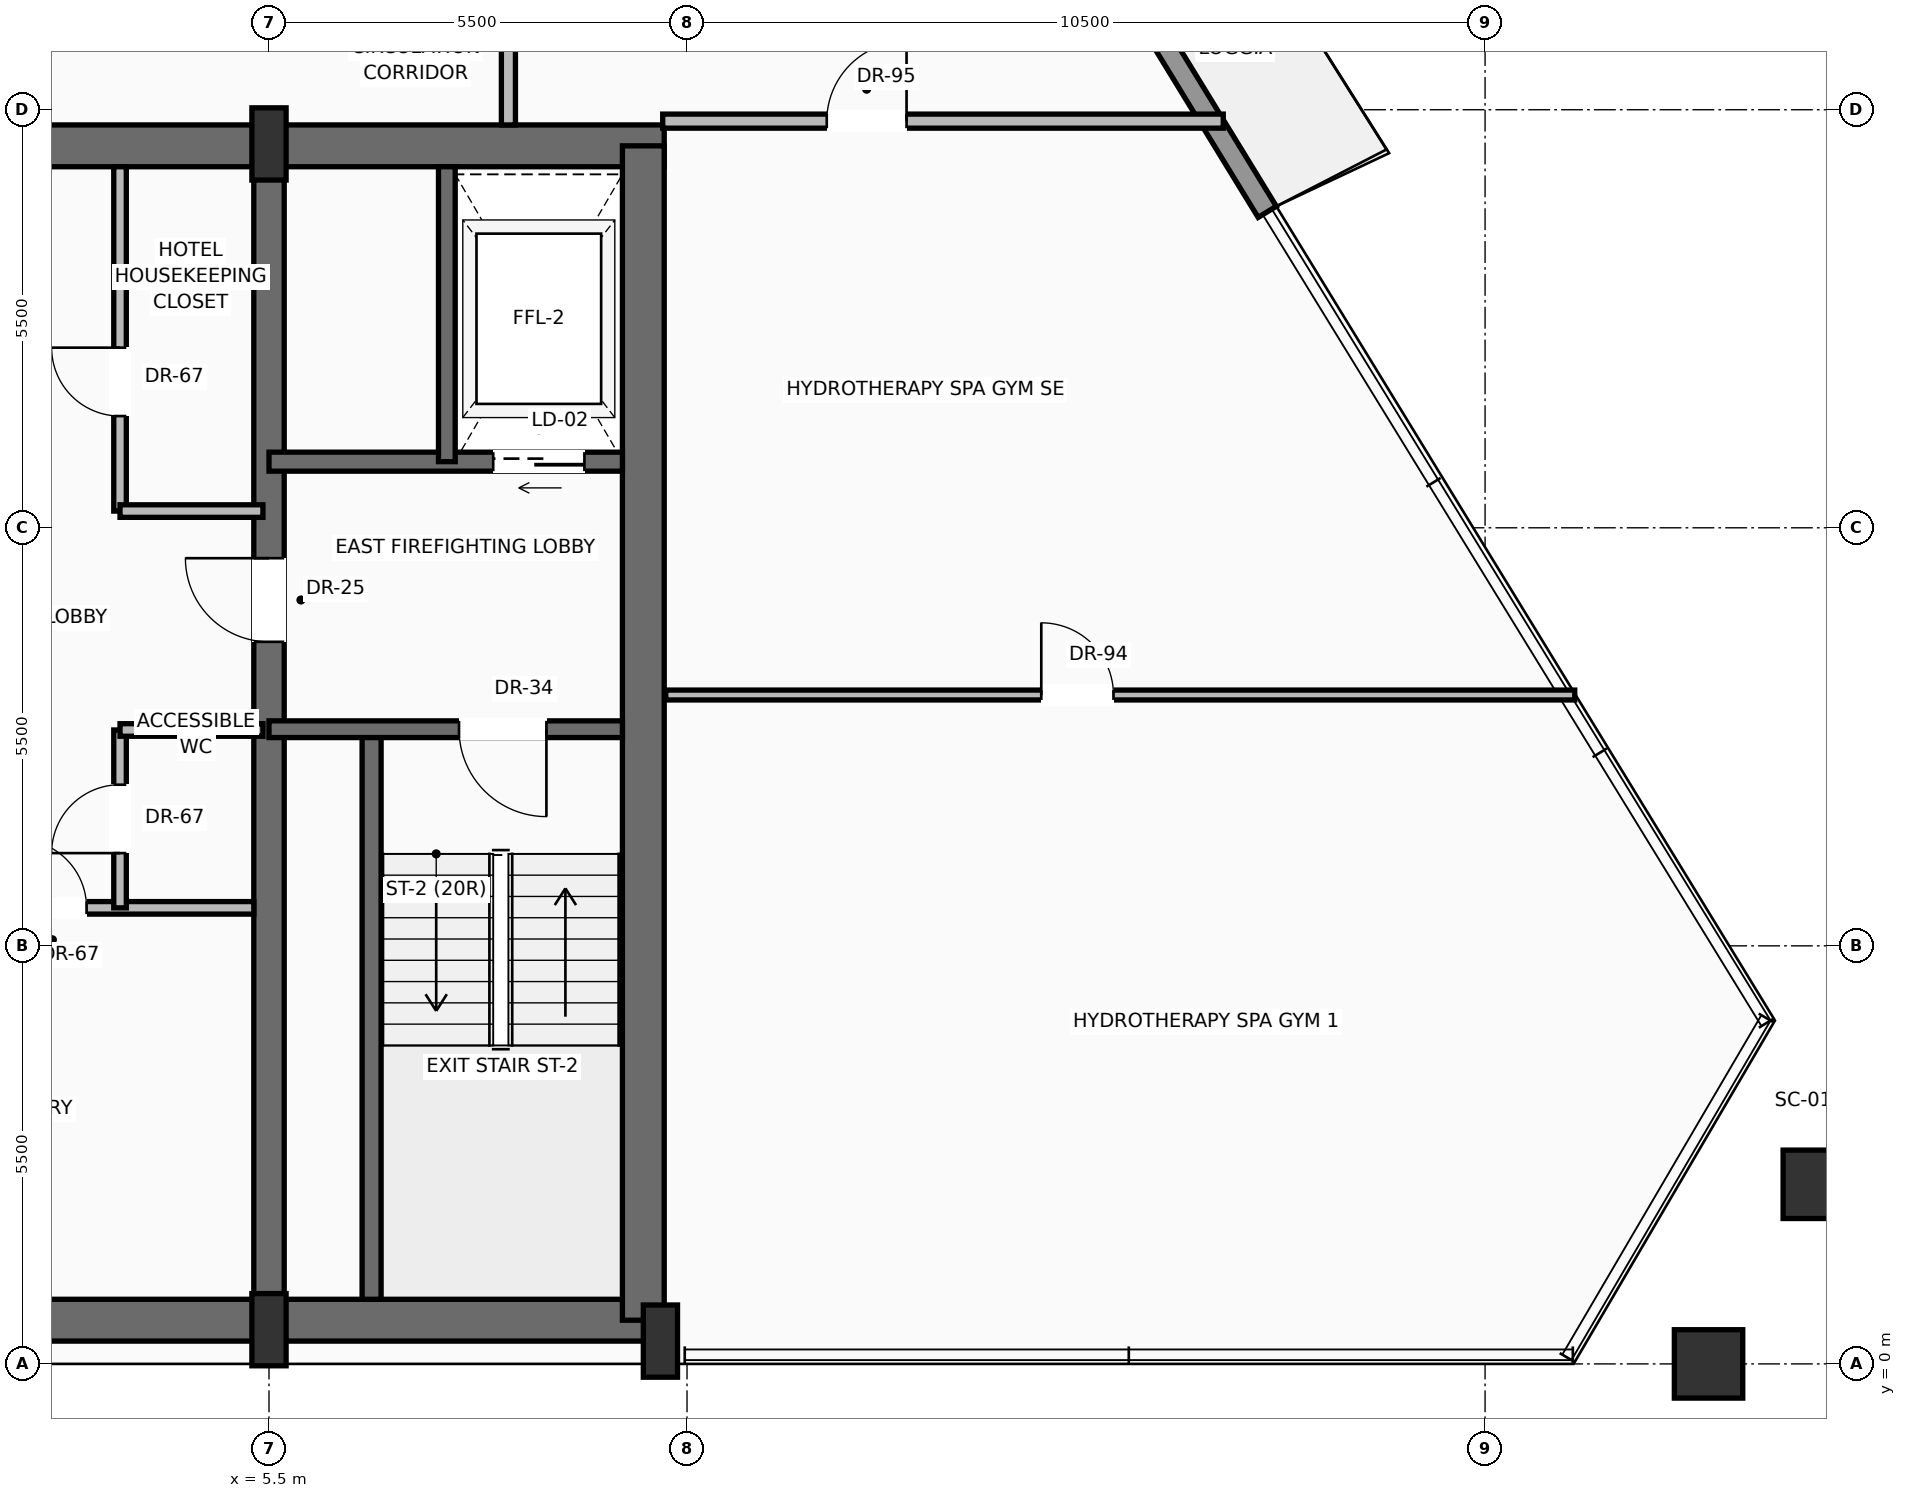
"""IFC4 building model, lengths in metres.
Left out: names, types, materials, properties, quantities, classifications, styles, units other than length and angle.
Written with IfcOpenShell. Run it as: python <this file> out.ifc"""

import sys

from ifc_helpers import new_model, si_unit, direction, frame, frame_2d, origin, origin_2d, place, context, subcontext, project, spatial, rectangle, hollow_rectangle, extrude, source, transform, mapped, element, fill, save


model = new_model("IFC4")
c1 = context("Model", 3, precision=1e-05, world=origin(), true_north=direction((0.0, 1.0)))
c2 = subcontext(c1, "Body", "Model", "MODEL_VIEW")
j1 = project(units=[si_unit("LENGTHUNIT", "METRE"), si_unit("PLANEANGLEUNIT", "RADIAN")], contexts=[c1])
p1 = place(None, origin())
s1 = spatial("IfcSite", under=j1, at=p1, CompositionType="ELEMENT")
p2 = place(p1, origin())
s2 = spatial("IfcBuilding", under=s1, at=p2, CompositionType="ELEMENT")
p3 = place(p2, frame((0.0, 0.0, 247.6)))
s3 = spatial("IfcBuildingStorey", under=s2, at=p3, CompositionType="ELEMENT", Elevation=247.6)
p4 = place(p3, frame((-10.65, 0.575, 0.0), z_axis=(0.0, 0.0, 1.0), x_axis=(1.0, 0.0, 0.0)))
e1 = element("IfcWall", 1, at=p4, inside=s3, PredefinedType="SHEAR", context=c2, shape_type="SweptSolid", body=[
    extrude(rectangle(XDim=21.3, YDim=0.55, at=frame_2d((10.65, 0.0))), origin(), (0.0, 0.0, 1.0), 3.24),
])
p5 = place(p3, frame((-10.7, 16.025, 0.0), z_axis=(0.0, 0.0, 1.0), x_axis=(1.0, 0.0, 0.0)))
e2 = element("IfcWall", 2, at=p5, inside=s3, PredefinedType="SHEAR", context=c2, shape_type="SweptSolid", body=[
    extrude(rectangle(XDim=21.4, YDim=0.55, at=frame_2d((10.7, 0.0))), origin(), (0.0, 0.0, 1.0), 3.24),
])
p6 = place(p5, frame((3.27, 0.0, 0.0)))
e3 = element("IfcOpeningElement", 3, at=p6, cuts=e2, PredefinedType="OPENING", context=c2, shape_type="SweptSolid", body=[
    extrude(rectangle(XDim=1.3, YDim=2.3, at=frame_2d((0.65, 1.15))), frame((0.0, 0.285, 0.0), z_axis=(0.0, -1.0, 0.0), x_axis=(1.0, 0.0, 0.0)), (0.0, 0.0, 1.0), 0.57),
])
p7 = place(p5, frame((9.7, 0.0, 0.0)))
e4 = element("IfcOpeningElement", 4, at=p7, cuts=e2, PredefinedType="OPENING", context=c2, shape_type="SweptSolid", body=[
    extrude(rectangle(XDim=2.0, YDim=2.4, at=frame_2d((1.0, 1.2))), frame((0.0, 0.285, 0.0), z_axis=(0.0, -1.0, 0.0), x_axis=(1.0, 0.0, 0.0)), (0.0, 0.0, 1.0), 0.57),
])
p8 = place(p3, frame((10.425, 0.575, 0.0), z_axis=(0.0, 0.0, 1.0), x_axis=(0.0, 1.0, 0.0)))
e5 = element("IfcWall", 5, at=p8, inside=s3, PredefinedType="SHEAR", context=c2, shape_type="SweptSolid", body=[
    extrude(rectangle(XDim=15.45, YDim=0.55, at=frame_2d((7.725, 0.0))), origin(), (0.0, 0.0, 1.0), 3.24),
])
p9 = place(p3, frame((5.5, 0.575, 0.0), z_axis=(0.0, 0.0, 1.0), x_axis=(0.0, 1.0, 0.0)))
e6 = element("IfcWall", 6, at=p9, inside=s3, PredefinedType="SHEAR", context=c2, shape_type="SweptSolid", body=[
    extrude(rectangle(XDim=15.45, YDim=0.4, at=frame_2d((7.725, 0.0))), origin(), (0.0, 0.0, 1.0), 3.24),
])
p10 = place(p9, frame((8.925, 0.0, 0.0)))
e7 = element("IfcOpeningElement", 7, at=p10, cuts=e6, PredefinedType="OPENING", context=c2, shape_type="SweptSolid", body=[
    extrude(rectangle(XDim=1.1, YDim=2.2, at=frame_2d((0.55, 1.1))), frame((0.0, 0.21, 0.0), z_axis=(0.0, -1.0, 0.0), x_axis=(1.0, 0.0, 0.0)), (0.0, 0.0, 1.0), 0.42),
])
m1 = source(origin(), c2, "Body", "SweptSolid", [
    extrude(rectangle(XDim=0.45, YDim=0.95, at=origin_2d()), origin(), (0.0, 0.0, 1.0), 3.45),
])
for number, where, z_axis, x_axis in (
    (8, (5.5, 0.45, 0.0), (0.0, 0.0, 1.0), (1.0, 0.0, 0.0)),
    (9, (10.65, 0.3, 0.0), (0.0, 0.0, 1.0), (1.0, 0.0, 0.0)),
    (10, (5.5, 16.05, 0.0), (0.0, 0.0, 1.0), (1.0, 0.0, 0.0)),
):
    element("IfcColumn", number, at=place(p3, frame(where, z_axis=z_axis, x_axis=x_axis)), inside=s3, PredefinedType="PILASTER", context=c2, shape_type="MappedRepresentation", body=[
        mapped(m1, transform((0.0, 0.0, 0.0), scale=1.0)),
    ])
m2 = source(origin(), c2, "Body", "SweptSolid", [
    extrude(hollow_rectangle(XDim=0.9, YDim=0.9, WallThickness=0.045, at=origin_2d()), origin(), (0.0, 0.0, 1.0), 3.441),
])
p11 = place(p3, frame((24.44, 0.0, 0.004), z_axis=(0.000283788566, 0.0, 0.999999959732), x_axis=(1.0, 0.0, 0.0)))
e11 = element("IfcColumn", 11, at=p11, inside=s3, PredefinedType="COLUMN", context=c2, shape_type="MappedRepresentation", body=[
    mapped(m2, transform((0.0, 0.0, 0.0), scale=1.0)),
])
m3 = source(origin(), c2, "Body", "SweptSolid", [
    extrude(hollow_rectangle(XDim=0.9, YDim=0.9, WallThickness=0.045, at=origin_2d()), origin(), (0.0, 0.0, 1.0), 3.442),
])
p12 = place(p3, frame((25.871, 2.363, 0.004), z_axis=(-0.010356360829, -0.016243881026, 0.999814423841), x_axis=(0.843206334373, -0.537590064709, 0.0)))
e12 = element("IfcColumn", 12, at=p12, inside=s3, PredefinedType="COLUMN", context=c2, shape_type="MappedRepresentation", body=[
    mapped(m3, transform((0.0, 0.0, 0.0), scale=1.0)),
])
p13 = place(p3, frame((8.324, 31.99, 0.0), z_axis=(0.0, 0.0, 1.0), x_axis=(0.522311741814, -0.852754621426, 0.0)))
e13 = element("IfcWall", 13, at=p13, inside=s3, PredefinedType="SOLIDWALL", context=c2, shape_type="SweptSolid", body=[
    extrude(rectangle(XDim=19.739, YDim=0.28, at=frame_2d((9.87, 0.0))), origin(), (0.0, 0.0, 1.0), 2.82),
])
p14 = place(p13, frame((4.737, 0.0, 0.0)))
e14 = element("IfcOpeningElement", 14, at=p14, cuts=e13, PredefinedType="OPENING", context=c2, shape_type="SweptSolid", body=[
    extrude(rectangle(XDim=1.6, YDim=2.35, at=frame_2d((0.8, 1.175))), frame((0.0, 0.15, 0.0), z_axis=(0.0, -1.0, 0.0), x_axis=(1.0, 0.0, 0.0)), (0.0, 0.0, 1.0), 0.3),
])
p15 = place(p13, frame((13.423, 0.0, 0.9)))
e15 = element("IfcOpeningElement", 15, at=p15, cuts=e13, PredefinedType="OPENING", context=c2, shape_type="SweptSolid", body=[
    extrude(rectangle(XDim=2.0, YDim=1.75, at=frame_2d((1.0, 0.875))), frame((0.0, 0.15, 0.0), z_axis=(0.0, -1.0, 0.0), x_axis=(1.0, 0.0, 0.0)), (0.0, 0.0, 1.0), 0.3),
])
p16 = place(p3, frame((6.85, 0.85, 0.0), z_axis=(0.0, 0.0, 1.0), x_axis=(0.0, 1.0, 0.0)))
e16 = element("IfcWall", 16, at=p16, inside=s3, PredefinedType="SOLIDWALL", context=c2, shape_type="SweptSolid", body=[
    extrude(rectangle(XDim=7.5, YDim=0.25, at=frame_2d((3.75, 0.0))), origin(), (0.0, 0.0, 1.0), 3.24),
])
p17 = place(p3, frame((10.15, 8.35, 0.0), z_axis=(0.0, 0.0, 1.0), x_axis=(-1.0, 0.0, 0.0)))
e17 = element("IfcWall", 17, at=p17, inside=s3, PredefinedType="SOLIDWALL", context=c2, shape_type="SweptSolid", body=[
    extrude(rectangle(XDim=4.65, YDim=0.22, at=frame_2d((2.325, 0.0))), origin(), (0.0, 0.0, 1.0), 3.24),
])
p18 = place(p17, frame((1.0, 0.0, 0.0)))
e18 = element("IfcOpeningElement", 18, at=p18, cuts=e17, PredefinedType="OPENING", context=c2, shape_type="SweptSolid", body=[
    extrude(rectangle(XDim=1.15, YDim=2.2, at=frame_2d((0.575, 1.1))), frame((0.0, 0.12, 0.0), z_axis=(0.0, -1.0, 0.0), x_axis=(1.0, 0.0, 0.0)), (0.0, 0.0, 1.0), 0.24),
])
p19 = place(p3, frame((10.15, 11.87, 0.0), z_axis=(0.0, 0.0, 1.0), x_axis=(-1.0, 0.0, 0.0)))
e19 = element("IfcWall", 19, at=p19, inside=s3, PredefinedType="SOLIDWALL", context=c2, shape_type="SweptSolid", body=[
    extrude(rectangle(XDim=4.65, YDim=0.25, at=frame_2d((2.325, 0.0))), origin(), (0.0, 0.0, 1.0), 3.24),
])
p20 = place(p19, frame((0.5, 0.0, 0.0)))
e20 = element("IfcOpeningElement", 20, at=p20, cuts=e19, PredefinedType="OPENING", context=c2, shape_type="SweptSolid", body=[
    extrude(rectangle(XDim=1.2, YDim=2.25, at=frame_2d((0.6, 1.125))), frame((0.0, 0.135, 0.0), z_axis=(0.0, -1.0, 0.0), x_axis=(1.0, 0.0, 0.0)), (0.0, 0.0, 1.0), 0.27),
])
p21 = place(p3, frame((7.84, 11.87, 0.0), z_axis=(0.0, 0.0, 1.0), x_axis=(0.0, 1.0, 0.0)))
e21 = element("IfcWall", 21, at=p21, inside=s3, PredefinedType="SOLIDWALL", context=c2, shape_type="SweptSolid", body=[
    extrude(rectangle(XDim=3.88, YDim=0.22, at=frame_2d((1.94, 0.0))), origin(), (0.0, 0.0, 1.0), 3.24),
])
p22 = place(p3, frame((-5.5, 6.0, 0.0), z_axis=(0.0, 0.0, 1.0), x_axis=(1.0, 0.0, 0.0)))
e22 = element("IfcWall", 22, at=p22, inside=s3, PredefinedType="PARTITIONING", context=c2, shape_type="SweptSolid", body=[
    extrude(rectangle(XDim=10.8, YDim=0.165, at=frame_2d((5.4, 0.0))), origin(), (0.0, 0.0, 1.0), 3.232),
])
p23 = place(p22, frame((7.7, 0.0, 0.0)))
e23 = element("IfcOpeningElement", 23, at=p23, cuts=e22, PredefinedType="OPENING", context=c2, shape_type="SweptSolid", body=[
    extrude(rectangle(XDim=0.9, YDim=2.1, at=frame_2d((0.45, 1.05))), frame((0.0, 0.093, 0.0), z_axis=(0.0, -1.0, 0.0), x_axis=(1.0, 0.0, 0.0)), (0.0, 0.0, 1.0), 0.185),
])
p24 = place(p3, frame((3.54, 6.0, 0.0), z_axis=(0.0, 0.0, 1.0), x_axis=(0.0, 1.0, 0.0)))
e24 = element("IfcWall", 24, at=p24, inside=s3, PredefinedType="PARTITIONING", context=c2, shape_type="SweptSolid", body=[
    extrude(rectangle(XDim=2.34, YDim=0.165, at=frame_2d((1.17, 0.0))), origin(), (0.0, 0.0, 1.0), 3.232),
])
p25 = place(p24, frame((0.72, 0.0, 0.0)))
e25 = element("IfcOpeningElement", 25, at=p25, cuts=e24, PredefinedType="OPENING", context=c2, shape_type="SweptSolid", body=[
    extrude(rectangle(XDim=0.9, YDim=2.1, at=frame_2d((0.45, 1.05))), frame((0.0, 0.093, 0.0), z_axis=(0.0, -1.0, 0.0), x_axis=(1.0, 0.0, 0.0)), (0.0, 0.0, 1.0), 0.185),
])
p26 = place(p3, frame((3.54, 8.34, 0.0), z_axis=(0.0, 0.0, 1.0), x_axis=(1.0, 0.0, 0.0)))
e26 = element("IfcWall", 26, at=p26, inside=s3, PredefinedType="PARTITIONING", context=c2, shape_type="SweptSolid", body=[
    extrude(rectangle(XDim=1.88, YDim=0.165, at=frame_2d((0.94, 0.0))), origin(), (0.0, 0.0, 1.0), 3.232),
])
p27 = place(p3, frame((3.54, 11.22, 0.0), z_axis=(0.0, 0.0, 1.0), x_axis=(0.0, 1.0, 0.0)))
e27 = element("IfcWall", 27, at=p27, inside=s3, PredefinedType="PARTITIONING", context=c2, shape_type="SweptSolid", body=[
    extrude(rectangle(XDim=4.53, YDim=0.165, at=frame_2d((2.265, 0.0))), origin(), (0.0, 0.0, 1.0), 3.232),
])
p28 = place(p27, frame((1.25, 0.0, 0.0)))
e28 = element("IfcOpeningElement", 28, at=p28, cuts=e27, PredefinedType="OPENING", context=c2, shape_type="SweptSolid", body=[
    extrude(rectangle(XDim=0.9, YDim=2.1, at=frame_2d((0.45, 1.05))), frame((0.0, 0.093, 0.0), z_axis=(0.0, -1.0, 0.0), x_axis=(1.0, 0.0, 0.0)), (0.0, 0.0, 1.0), 0.185),
])
p29 = place(p3, frame((3.54, 11.22, 0.0), z_axis=(0.0, 0.0, 1.0), x_axis=(1.0, 0.0, 0.0)))
e29 = element("IfcWall", 29, at=p29, inside=s3, PredefinedType="PARTITIONING", context=c2, shape_type="SweptSolid", body=[
    extrude(rectangle(XDim=1.88, YDim=0.165, at=frame_2d((0.94, 0.0))), origin(), (0.0, 0.0, 1.0), 3.232),
])
p30 = place(p3, frame((8.65, 16.3, 0.0), z_axis=(0.0, 0.0, 1.0), x_axis=(0.0, 1.0, 0.0)))
e30 = element("IfcWall", 30, at=p30, inside=s3, PredefinedType="PARTITIONING", context=c2, shape_type="SweptSolid", body=[
    extrude(rectangle(XDim=13.9, YDim=0.185, at=frame_2d((6.95, 0.0))), origin(), (0.0, 0.0, 1.0), 3.232),
])
p31 = place(p30, frame((3.144, 0.0, 0.0)))
e31 = element("IfcOpeningElement", 31, at=p31, cuts=e30, PredefinedType="OPENING", context=c2, shape_type="SweptSolid", body=[
    extrude(rectangle(XDim=1.05, YDim=2.25, at=frame_2d((0.525, 1.125))), frame((0.0, 0.103, 0.0), z_axis=(0.0, -1.0, 0.0), x_axis=(1.0, 0.0, 0.0)), (0.0, 0.0, 1.0), 0.205),
])
p32 = place(p3, frame((10.68, 16.35, 0.0), z_axis=(0.0, 0.0, 1.0), x_axis=(1.0, 0.0, 0.0)))
e32 = element("IfcWall", 32, at=p32, inside=s3, PredefinedType="PARTITIONING", context=c2, shape_type="SweptSolid", body=[
    extrude(rectangle(XDim=7.375, YDim=0.185, at=frame_2d((3.688, 0.0))), origin(), (0.0, 0.0, 1.0), 3.232),
])
p33 = place(p32, frame((2.158, 0.0, 0.0)))
e33 = element("IfcOpeningElement", 33, at=p33, cuts=e32, PredefinedType="OPENING", context=c2, shape_type="SweptSolid", body=[
    extrude(rectangle(XDim=1.05, YDim=2.25, at=frame_2d((0.525, 1.125))), frame((0.0, 0.103, 0.0), z_axis=(0.0, -1.0, 0.0), x_axis=(1.0, 0.0, 0.0)), (0.0, 0.0, 1.0), 0.205),
])
p34 = place(p3, frame((10.72, 8.8, 0.0), z_axis=(0.0, 0.0, 1.0), x_axis=(1.0, 0.0, 0.0)))
e34 = element("IfcWall", 34, at=p34, inside=s3, PredefinedType="PARTITIONING", context=c2, shape_type="SweptSolid", body=[
    extrude(rectangle(XDim=11.96, YDim=0.13, at=frame_2d((5.98, 0.0))), origin(), (0.0, 0.0, 1.0), 3.232),
])
p35 = place(p34, frame((4.941, 0.0, 0.0)))
e35 = element("IfcOpeningElement", 35, at=p35, cuts=e34, PredefinedType="OPENING", context=c2, shape_type="SweptSolid", body=[
    extrude(rectangle(XDim=0.95, YDim=2.2, at=frame_2d((0.475, 1.1))), frame((0.0, 0.075, 0.0), z_axis=(0.0, -1.0, 0.0), x_axis=(1.0, 0.0, 0.0)), (0.0, 0.0, 1.0), 0.15),
])
m4 = source(origin(), c2, "Body", "SweptSolid", [
    extrude(rectangle(XDim=1.15, YDim=2.2, at=frame_2d((0.575, 1.1))), frame((0.0, 0.025, 0.0), z_axis=(0.0, -1.0, 0.0), x_axis=(1.0, 0.0, 0.0)), (0.0, 0.0, 1.0), 0.05),
])
p36 = place(p18, origin())
e36 = element("IfcDoor", 36, at=p36, inside=s3, OperationType="SINGLE_SWING_LEFT", PredefinedType="DOOR", context=c2, shape_type="MappedRepresentation", body=[
    mapped(m4, transform((0.0, 0.0, 0.0), scale=1.0)),
])
fill(e18, e36)
m5 = source(origin(), c2, "Body", "SweptSolid", [
    extrude(rectangle(XDim=1.1, YDim=2.2, at=frame_2d((0.55, 1.1))), frame((0.0, 0.025, 0.0), z_axis=(0.0, -1.0, 0.0), x_axis=(1.0, 0.0, 0.0)), (0.0, 0.0, 1.0), 0.05),
])
p37 = place(p10, origin())
e37 = element("IfcDoor", 37, at=p37, inside=s3, OperationType="SINGLE_SWING_RIGHT", PredefinedType="DOOR", context=c2, shape_type="MappedRepresentation", body=[
    mapped(m5, transform((0.0, 0.0, 0.0), scale=1.0)),
])
fill(e7, e37)
m6 = source(origin(), c2, "Body", "SweptSolid", [
    extrude(rectangle(XDim=1.2, YDim=2.25, at=frame_2d((0.6, 1.125))), frame((0.0, 0.025, 0.0), z_axis=(0.0, -1.0, 0.0), x_axis=(1.0, 0.0, 0.0)), (0.0, 0.0, 1.0), 0.05),
])
p38 = place(p20, origin())
e38 = element("IfcDoor", 38, at=p38, inside=s3, OperationType="SLIDING_TO_RIGHT", PredefinedType="DOOR", context=c2, shape_type="MappedRepresentation", body=[
    mapped(m6, transform((0.0, 0.0, 0.0), scale=1.0)),
])
fill(e20, e38)
m7 = source(origin(), c2, "Body", "SweptSolid", [
    extrude(rectangle(XDim=0.9, YDim=2.1, at=frame_2d((0.45, 1.05))), frame((0.0, 0.025, 0.0), z_axis=(0.0, -1.0, 0.0), x_axis=(1.0, 0.0, 0.0)), (0.0, 0.0, 1.0), 0.05),
])
p39 = place(p23, origin())
e39 = element("IfcDoor", 39, at=p39, inside=s3, OperationType="SINGLE_SWING_LEFT", PredefinedType="DOOR", context=c2, shape_type="MappedRepresentation", body=[
    mapped(m7, transform((0.0, 0.0, 0.0), scale=1.0)),
])
fill(e23, e39)
p40 = place(p25, origin())
e40 = element("IfcDoor", 40, at=p40, inside=s3, OperationType="SINGLE_SWING_LEFT", PredefinedType="DOOR", context=c2, shape_type="MappedRepresentation", body=[
    mapped(m7, transform((0.0, 0.0, 0.0), scale=1.0)),
])
fill(e25, e40)
p41 = place(p28, origin())
e41 = element("IfcDoor", 41, at=p41, inside=s3, OperationType="SINGLE_SWING_RIGHT", PredefinedType="DOOR", context=c2, shape_type="MappedRepresentation", body=[
    mapped(m7, transform((0.0, 0.0, 0.0), scale=1.0)),
])
fill(e28, e41)
m8 = source(origin(), c2, "Body", "SweptSolid", [
    extrude(rectangle(XDim=1.05, YDim=2.25, at=frame_2d((0.525, 1.125))), frame((0.0, 0.025, 0.0), z_axis=(0.0, -1.0, 0.0), x_axis=(1.0, 0.0, 0.0)), (0.0, 0.0, 1.0), 0.05),
])
p42 = place(p33, origin())
e42 = element("IfcDoor", 42, at=p42, inside=s3, OperationType="SINGLE_SWING_RIGHT", PredefinedType="DOOR", context=c2, shape_type="MappedRepresentation", body=[
    mapped(m8, transform((0.0, 0.0, 0.0), scale=1.0)),
])
fill(e33, e42)
m9 = source(origin(), c2, "Body", "SweptSolid", [
    extrude(rectangle(XDim=0.95, YDim=2.2, at=frame_2d((0.475, 1.1))), frame((0.0, 0.025, 0.0), z_axis=(0.0, -1.0, 0.0), x_axis=(1.0, 0.0, 0.0)), (0.0, 0.0, 1.0), 0.05),
])
p43 = place(p35, origin())
e43 = element("IfcDoor", 43, at=p43, inside=s3, OperationType="SINGLE_SWING_LEFT", PredefinedType="DOOR", context=c2, shape_type="MappedRepresentation", body=[
    mapped(m9, transform((0.0, 0.0, 0.0), scale=1.0)),
])
fill(e35, e43)
save(model, sys.argv[1])
